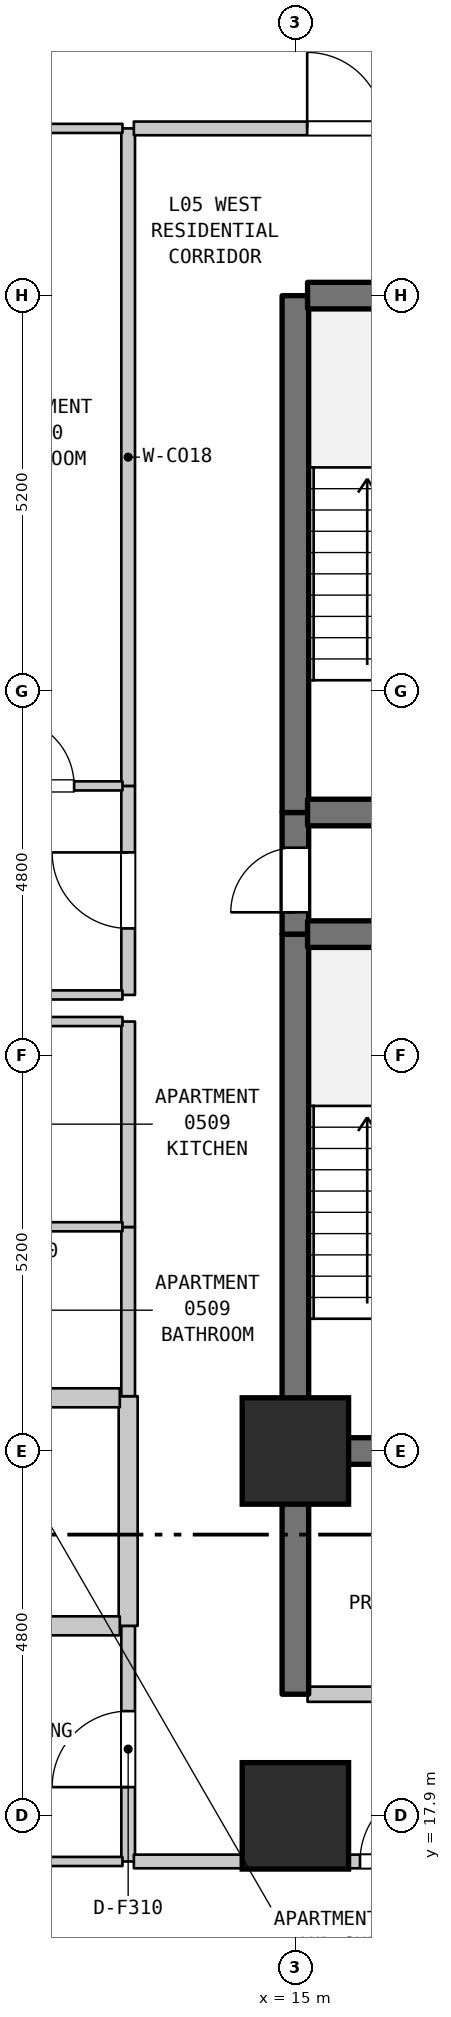
"""IFC4 building model, lengths in metres.
Left out: names, types, materials, properties, quantities, classifications, styles, units other than length and angle.
Written with IfcOpenShell. Run it as: python <this file> out.ifc"""

import sys

from ifc_helpers import new_model, si_unit, direction, frame, frame_2d, origin, origin_2d, place, context, subcontext, project, spatial, rectangle, extrude, element, fill, save


model = new_model("IFC4")
c1 = context("Model", 3, precision=1e-05, world=origin(), true_north=direction((0.0, 1.0)))
c2 = subcontext(c1, "Body", "Model", "MODEL_VIEW")
j1 = project(units=[si_unit("LENGTHUNIT", "METRE"), si_unit("PLANEANGLEUNIT", "RADIAN")], contexts=[c1])
p1 = place(None, origin())
s1 = spatial("IfcSite", under=j1, at=p1, CompositionType="ELEMENT")
p2 = place(p1, origin())
s2 = spatial("IfcBuilding", under=s1, at=p2, CompositionType="ELEMENT")
p3 = place(p2, frame((0.0, 0.0, 27.7)))
s3 = spatial("IfcBuildingStorey", under=s2, at=p3, CompositionType="ELEMENT", Elevation=27.7)
for number, where, z_axis, x_axis in (
    (1, (15.0, 17.9, 0.0), (0.0, 0.0, 1.0), (1.0, 0.0, 0.0)),
    (2, (15.0, 22.7, 0.0), (0.0, 0.0, 1.0), (1.0, 0.0, 0.0)),
):
    element("IfcColumn", number, at=place(p3, frame(where, z_axis=z_axis, x_axis=x_axis)), inside=s3, PredefinedType="COLUMN", context=c2, shape_type="SweptSolid", body=[
        extrude(rectangle(XDim=1.4, YDim=1.4, at=origin_2d()), origin(), (0.0, 0.0, 1.0), 3.7),
    ])
p4 = place(p3, frame((12.8, 17.3, 0.0), z_axis=(0.0, 0.0, 1.0), x_axis=(0.0, 1.0, 0.0)))
e3 = element("IfcWall", 3, at=p4, inside=s3, PredefinedType="STANDARD", context=c2, shape_type="SweptSolid", body=[
    extrude(rectangle(XDim=3.1, YDim=0.18, at=frame_2d((1.55, 0.0))), origin(), (0.0, 0.0, 1.0), 3.385),
])
p5 = place(p4, frame((0.978, 0.0, 0.0)))
e4 = element("IfcOpeningElement", 4, at=p5, cuts=e3, PredefinedType="OPENING", context=c2, shape_type="SweptSolid", body=[
    extrude(rectangle(XDim=1.0, YDim=2.15, at=frame_2d((0.5, 1.075))), frame((0.0, 0.1, 0.0), z_axis=(0.0, -1.0, 0.0), x_axis=(1.0, 0.0, 0.0)), (0.0, 0.0, 1.0), 0.2),
])
p6 = place(p3, frame((12.8, 20.4, 0.0), z_axis=(0.0, 0.0, 1.0), x_axis=(0.0, 1.0, 0.0)))
e5 = element("IfcWall", 5, at=p6, inside=s3, PredefinedType="STANDARD", context=c2, shape_type="SweptSolid", body=[
    extrude(rectangle(XDim=3.021, YDim=0.25, at=frame_2d((1.51, 0.0))), origin(), (0.0, 0.0, 1.0), 3.385),
])
p7 = place(p3, frame((12.8, 23.421, 0.0), z_axis=(0.0, 0.0, 1.0), x_axis=(0.0, 1.0, 0.0)))
e6 = element("IfcWall", 6, at=p7, inside=s3, PredefinedType="STANDARD", context=c2, shape_type="SweptSolid", body=[
    extrude(rectangle(XDim=2.226, YDim=0.18, at=frame_2d((1.113, 0.0))), origin(), (0.0, 0.0, 1.0), 3.385),
])
p8 = place(p3, frame((12.8, 25.647, 0.0), z_axis=(0.0, 0.0, 1.0), x_axis=(0.0, 1.0, 0.0)))
e7 = element("IfcWall", 7, at=p8, inside=s3, PredefinedType="STANDARD", context=c2, shape_type="SweptSolid", body=[
    extrude(rectangle(XDim=2.703, YDim=0.18, at=frame_2d((1.352, 0.0))), origin(), (0.0, 0.0, 1.0), 3.385),
])
p9 = place(p3, frame((12.8, 28.7, 0.0), z_axis=(0.0, 0.0, 1.0), x_axis=(0.0, 1.0, 0.0)))
e8 = element("IfcWall", 8, at=p9, inside=s3, PredefinedType="STANDARD", context=c2, shape_type="SweptSolid", body=[
    extrude(rectangle(XDim=2.75, YDim=0.18, at=frame_2d((1.375, 0.0))), origin(), (0.0, 0.0, 1.0), 3.385),
])
p10 = place(p9, frame((0.875, 0.0, 0.0)))
e9 = element("IfcOpeningElement", 9, at=p10, cuts=e8, PredefinedType="OPENING", context=c2, shape_type="SweptSolid", body=[
    extrude(rectangle(XDim=1.0, YDim=2.15, at=frame_2d((0.5, 1.075))), frame((0.0, 0.1, 0.0), z_axis=(0.0, -1.0, 0.0), x_axis=(1.0, 0.0, 0.0)), (0.0, 0.0, 1.0), 0.2),
])
p11 = place(p3, frame((12.8, 31.45, 0.0), z_axis=(0.0, 0.0, 1.0), x_axis=(0.0, 1.0, 0.0)))
e10 = element("IfcWall", 10, at=p11, inside=s3, PredefinedType="STANDARD", context=c2, shape_type="SweptSolid", body=[
    extrude(rectangle(XDim=8.65, YDim=0.18, at=frame_2d((4.325, 0.0))), origin(), (0.0, 0.0, 1.0), 3.385),
])
p12 = place(p3, frame((15.0, 19.5, 0.0), z_axis=(0.0, 0.0, 1.0), x_axis=(0.0, 1.0, 0.0)))
e11 = element("IfcWall", 11, at=p12, inside=s3, PredefinedType="SHEAR", context=c2, shape_type="SweptSolid", body=[
    extrude(rectangle(XDim=3.2, YDim=0.35, at=frame_2d((1.6, 0.0))), origin(), (0.0, 0.0, 1.0), 3.385),
])
p13 = place(p3, frame((15.0, 22.7, 0.0), z_axis=(0.0, 0.0, 1.0), x_axis=(0.0, 1.0, 0.0)))
e12 = element("IfcWall", 12, at=p13, inside=s3, PredefinedType="SHEAR", context=c2, shape_type="SweptSolid", body=[
    extrude(rectangle(XDim=6.8, YDim=0.35, at=frame_2d((3.4, 0.0))), origin(), (0.0, 0.0, 1.0), 3.385),
])
p14 = place(p3, frame((15.0, 29.5, 0.0), z_axis=(0.0, 0.0, 1.0), x_axis=(0.0, 1.0, 0.0)))
e13 = element("IfcWall", 13, at=p14, inside=s3, PredefinedType="SHEAR", context=c2, shape_type="SweptSolid", body=[
    extrude(rectangle(XDim=1.6, YDim=0.35, at=frame_2d((0.8, 0.0))), origin(), (0.0, 0.0, 1.0), 3.385),
])
p15 = place(p14, frame((0.287, 0.0, 0.0)))
e14 = element("IfcOpeningElement", 14, at=p15, cuts=e13, PredefinedType="OPENING", context=c2, shape_type="SweptSolid", body=[
    extrude(rectangle(XDim=0.85, YDim=2.1, at=frame_2d((0.425, 1.05))), frame((0.0, 0.185, 0.0), z_axis=(0.0, -1.0, 0.0), x_axis=(1.0, 0.0, 0.0)), (0.0, 0.0, 1.0), 0.37),
])
p16 = place(p3, frame((15.0, 31.1, 0.0), z_axis=(0.0, 0.0, 1.0), x_axis=(0.0, 1.0, 0.0)))
e15 = element("IfcWall", 15, at=p16, inside=s3, PredefinedType="SHEAR", context=c2, shape_type="SweptSolid", body=[
    extrude(rectangle(XDim=6.8, YDim=0.35, at=frame_2d((3.4, 0.0))), origin(), (0.0, 0.0, 1.0), 3.385),
])
p17 = place(p3, frame((9.085, 17.3, 0.0), z_axis=(0.0, 0.0, 1.0), x_axis=(1.0, 0.0, 0.0)))
e16 = element("IfcWall", 16, at=p17, inside=s3, PredefinedType="PARTITIONING", context=c2, shape_type="SweptSolid", body=[
    extrude(rectangle(XDim=3.64, YDim=0.12, at=frame_2d((1.82, 0.0))), origin(), (0.0, 0.0, 1.0), 3.385),
])
p18 = place(p3, frame((12.875, 17.3, 0.0), z_axis=(0.0, 0.0, 1.0), x_axis=(1.0, 0.0, 0.0)))
e17 = element("IfcWall", 17, at=p18, inside=s3, PredefinedType="STANDARD", context=c2, shape_type="SweptSolid", body=[
    extrude(rectangle(XDim=5.72, YDim=0.18, at=frame_2d((2.86, 0.0))), origin(), (0.0, 0.0, 1.0), 3.385),
])
p19 = place(p18, frame((2.975, 0.0, 0.0)))
e18 = element("IfcOpeningElement", 18, at=p19, cuts=e17, PredefinedType="OPENING", context=c2, shape_type="SweptSolid", body=[
    extrude(rectangle(XDim=1.0, YDim=2.15, at=frame_2d((0.5, 1.075))), frame((0.0, 0.1, 0.0), z_axis=(0.0, -1.0, 0.0), x_axis=(1.0, 0.0, 0.0)), (0.0, 0.0, 1.0), 0.2),
])
p20 = place(p3, frame((15.16, 19.5, 0.0), z_axis=(0.0, 0.0, 1.0), x_axis=(1.0, 0.0, 0.0)))
e19 = element("IfcWall", 19, at=p20, inside=s3, PredefinedType="STANDARD", context=c2, shape_type="SweptSolid", body=[
    extrude(rectangle(XDim=3.68, YDim=0.2, at=frame_2d((1.84, 0.0))), origin(), (0.0, 0.0, 1.0), 3.385),
])
p21 = place(p20, frame((1.39, 0.0, 0.0)))
e20 = element("IfcOpeningElement", 20, at=p21, cuts=e19, PredefinedType="OPENING", context=c2, shape_type="SweptSolid", body=[
    extrude(rectangle(XDim=0.9, YDim=2.15, at=frame_2d((0.45, 1.075))), frame((0.0, 0.11, 0.0), z_axis=(0.0, -1.0, 0.0), x_axis=(1.0, 0.0, 0.0)), (0.0, 0.0, 1.0), 0.22),
])
p22 = place(p3, frame((10.66, 20.4, 0.0), z_axis=(0.0, 0.0, 1.0), x_axis=(1.0, 0.0, 0.0)))
e21 = element("IfcWall", 21, at=p22, inside=s3, PredefinedType="STANDARD", context=c2, shape_type="SweptSolid", body=[
    extrude(rectangle(XDim=2.03, YDim=0.25, at=frame_2d((1.015, 0.0))), origin(), (0.0, 0.0, 1.0), 3.385),
])
p23 = place(p3, frame((15.16, 22.7, 0.0), z_axis=(0.0, 0.0, 1.0), x_axis=(1.0, 0.0, 0.0)))
e22 = element("IfcWall", 22, at=p23, inside=s3, PredefinedType="SHEAR", context=c2, shape_type="SweptSolid", body=[
    extrude(rectangle(XDim=3.68, YDim=0.35, at=frame_2d((1.84, 0.0))), origin(), (0.0, 0.0, 1.0), 3.385),
])
p24 = place(p3, frame((10.66, 23.4, 0.0), z_axis=(0.0, 0.0, 1.0), x_axis=(1.0, 0.0, 0.0)))
e23 = element("IfcWall", 23, at=p24, inside=s3, PredefinedType="STANDARD", context=c2, shape_type="SweptSolid", body=[
    extrude(rectangle(XDim=2.03, YDim=0.25, at=frame_2d((1.015, 0.0))), origin(), (0.0, 0.0, 1.0), 3.385),
])
for number, where, z_axis, x_axis in (
    (24, (10.595, 25.65, 0.0), (0.0, 0.0, 1.0), (1.0, 0.0, 0.0)),
    (25, (10.595, 28.35, 0.0), (0.0, 0.0, 1.0), (1.0, 0.0, 0.0)),
):
    element("IfcWall", number, at=place(p3, frame(where, z_axis=z_axis, x_axis=x_axis)), inside=s3, PredefinedType="PARTITIONING", context=c2, shape_type="SweptSolid", body=[
        extrude(rectangle(XDim=2.13, YDim=0.12, at=frame_2d((1.065, 0.0))), origin(), (0.0, 0.0, 1.0), 3.385),
    ])
p25 = place(p3, frame((9.03, 28.7, 0.0), z_axis=(0.0, 0.0, 1.0), x_axis=(1.0, 0.0, 0.0)))
e26 = element("IfcWall", 26, at=p25, inside=s3, PredefinedType="PARTITIONING", context=c2, shape_type="SweptSolid", body=[
    extrude(rectangle(XDim=3.695, YDim=0.12, at=frame_2d((1.848, 0.0))), origin(), (0.0, 0.0, 1.0), 3.385),
])
for number, where, z_axis, x_axis in (
    (27, (15.16, 29.5, 0.0), (0.0, 0.0, 1.0), (1.0, 0.0, 0.0)),
    (28, (15.16, 31.1, 0.0), (0.0, 0.0, 1.0), (1.0, 0.0, 0.0)),
):
    element("IfcWall", number, at=place(p3, frame(where, z_axis=z_axis, x_axis=x_axis)), inside=s3, PredefinedType="SHEAR", context=c2, shape_type="SweptSolid", body=[
        extrude(rectangle(XDim=3.68, YDim=0.35, at=frame_2d((1.84, 0.0))), origin(), (0.0, 0.0, 1.0), 3.385),
    ])
p26 = place(p3, frame((10.523, 31.45, 0.0), z_axis=(0.0, 0.0, 1.0), x_axis=(1.0, 0.0, 0.0)))
e29 = element("IfcWall", 29, at=p26, inside=s3, PredefinedType="PARTITIONING", context=c2, shape_type="SweptSolid", body=[
    extrude(rectangle(XDim=2.202, YDim=0.12, at=frame_2d((1.101, 0.0))), origin(), (0.0, 0.0, 1.0), 3.385),
])
p27 = place(p26, frame((0.666, 0.0, 0.0)))
e30 = element("IfcOpeningElement", 30, at=p27, cuts=e29, PredefinedType="OPENING", context=c2, shape_type="SweptSolid", body=[
    extrude(rectangle(XDim=0.9, YDim=2.1, at=frame_2d((0.45, 1.05))), frame((0.0, 0.07, 0.0), z_axis=(0.0, -1.0, 0.0), x_axis=(1.0, 0.0, 0.0)), (0.0, 0.0, 1.0), 0.14),
])
p28 = place(p3, frame((15.16, 37.9, 0.0), z_axis=(0.0, 0.0, 1.0), x_axis=(1.0, 0.0, 0.0)))
e31 = element("IfcWall", 31, at=p28, inside=s3, PredefinedType="SHEAR", context=c2, shape_type="SweptSolid", body=[
    extrude(rectangle(XDim=3.68, YDim=0.35, at=frame_2d((1.84, 0.0))), origin(), (0.0, 0.0, 1.0), 3.385),
])
p29 = place(p3, frame((10.523, 40.1, 0.0), z_axis=(0.0, 0.0, 1.0), x_axis=(1.0, 0.0, 0.0)))
e32 = element("IfcWall", 32, at=p29, inside=s3, PredefinedType="PARTITIONING", context=c2, shape_type="SweptSolid", body=[
    extrude(rectangle(XDim=2.202, YDim=0.12, at=frame_2d((1.101, 0.0))), origin(), (0.0, 0.0, 1.0), 3.385),
])
p30 = place(p3, frame((12.875, 40.1, 0.0), z_axis=(0.0, 0.0, 1.0), x_axis=(1.0, 0.0, 0.0)))
e33 = element("IfcWall", 33, at=p30, inside=s3, PredefinedType="STANDARD", context=c2, shape_type="SweptSolid", body=[
    extrude(rectangle(XDim=5.59, YDim=0.18, at=frame_2d((2.795, 0.0))), origin(), (0.0, 0.0, 1.0), 3.385),
])
p31 = place(p30, frame((2.28, 0.0, 0.0)))
e34 = element("IfcOpeningElement", 34, at=p31, cuts=e33, PredefinedType="OPENING", context=c2, shape_type="SweptSolid", body=[
    extrude(rectangle(XDim=1.0, YDim=2.15, at=frame_2d((0.5, 1.075))), frame((0.0, 0.1, 0.0), z_axis=(0.0, -1.0, 0.0), x_axis=(1.0, 0.0, 0.0)), (0.0, 0.0, 1.0), 0.2),
])
p32 = place(p5, origin())
e35 = element("IfcDoor", 35, at=p32, inside=s3, OperationType="SINGLE_SWING_LEFT", PredefinedType="DOOR", context=c2, shape_type="SweptSolid", body=[
    extrude(rectangle(XDim=1.0, YDim=2.15, at=frame_2d((0.5, 1.075))), frame((0.0, 0.025, 0.0), z_axis=(0.0, -1.0, 0.0), x_axis=(1.0, 0.0, 0.0)), (0.0, 0.0, 1.0), 0.05),
])
fill(e4, e35)
p33 = place(p10, origin())
e36 = element("IfcDoor", 36, at=p33, inside=s3, OperationType="SINGLE_SWING_RIGHT", PredefinedType="DOOR", context=c2, shape_type="SweptSolid", body=[
    extrude(rectangle(XDim=1.0, YDim=2.15, at=frame_2d((0.5, 1.075))), frame((0.0, 0.025, 0.0), z_axis=(0.0, -1.0, 0.0), x_axis=(1.0, 0.0, 0.0)), (0.0, 0.0, 1.0), 0.05),
])
fill(e9, e36)
p34 = place(p15, origin())
e37 = element("IfcDoor", 37, at=p34, inside=s3, OperationType="SINGLE_SWING_LEFT", PredefinedType="DOOR", context=c2, shape_type="SweptSolid", body=[
    extrude(rectangle(XDim=0.85, YDim=2.1, at=frame_2d((0.425, 1.05))), frame((0.0, 0.025, 0.0), z_axis=(0.0, -1.0, 0.0), x_axis=(1.0, 0.0, 0.0)), (0.0, 0.0, 1.0), 0.05),
])
fill(e14, e37)
p35 = place(p19, origin())
e38 = element("IfcDoor", 38, at=p35, inside=s3, OperationType="SINGLE_SWING_RIGHT", PredefinedType="DOOR", context=c2, shape_type="SweptSolid", body=[
    extrude(rectangle(XDim=1.0, YDim=2.15, at=frame_2d((0.5, 1.075))), frame((0.0, 0.025, 0.0), z_axis=(0.0, -1.0, 0.0), x_axis=(1.0, 0.0, 0.0)), (0.0, 0.0, 1.0), 0.05),
])
fill(e18, e38)
p36 = place(p27, origin())
e39 = element("IfcDoor", 39, at=p36, inside=s3, OperationType="SINGLE_SWING_LEFT", PredefinedType="DOOR", context=c2, shape_type="SweptSolid", body=[
    extrude(rectangle(XDim=0.9, YDim=2.1, at=frame_2d((0.45, 1.05))), frame((0.0, 0.025, 0.0), z_axis=(0.0, -1.0, 0.0), x_axis=(1.0, 0.0, 0.0)), (0.0, 0.0, 1.0), 0.05),
])
fill(e30, e39)
p37 = place(p31, origin())
e40 = element("IfcDoor", 40, at=p37, inside=s3, OperationType="SINGLE_SWING_LEFT", PredefinedType="DOOR", context=c2, shape_type="SweptSolid", body=[
    extrude(rectangle(XDim=1.0, YDim=2.15, at=frame_2d((0.5, 1.075))), frame((0.0, 0.025, 0.0), z_axis=(0.0, -1.0, 0.0), x_axis=(1.0, 0.0, 0.0)), (0.0, 0.0, 1.0), 0.05),
])
fill(e34, e40)
save(model, sys.argv[1])
